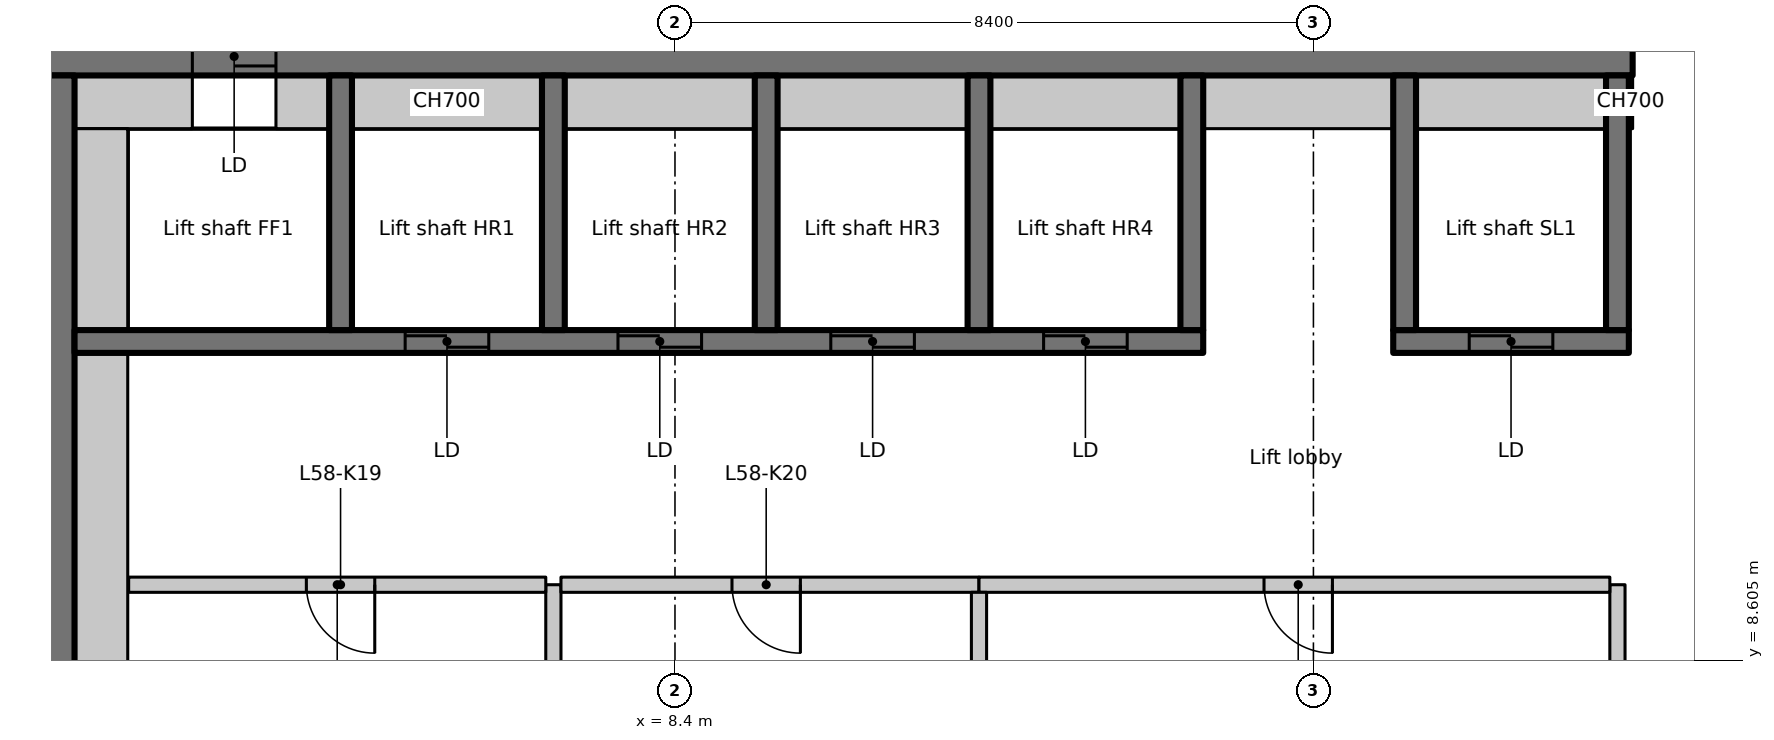
"""IFC4 building model, lengths in metres.
Left out: names, types, materials, properties, quantities, classifications, styles, units other than length and angle.
Written with IfcOpenShell. Run it as: python <this file> out.ifc"""

import sys

from ifc_helpers import new_model, si_unit, direction, frame, frame_2d, origin, place, context, subcontext, project, spatial, rectangle, extrude, element, fill, save


model = new_model("IFC4")
c1 = context("Model", 3, precision=1e-05, world=origin(), true_north=direction((0.0, 1.0)))
c2 = subcontext(c1, "Body", "Model", "MODEL_VIEW")
j1 = project(units=[si_unit("LENGTHUNIT", "METRE"), si_unit("PLANEANGLEUNIT", "RADIAN")], contexts=[c1])
p1 = place(None, origin())
s1 = spatial("IfcSite", under=j1, at=p1, CompositionType="ELEMENT")
p2 = place(p1, origin())
s2 = spatial("IfcBuilding", under=s1, at=p2, CompositionType="ELEMENT")
p3 = place(p2, frame((0.0, 0.0, 230.1)))
s3 = spatial("IfcBuildingStorey", under=s2, at=p3, CompositionType="ELEMENT", Elevation=230.1)
p4 = place(p3, frame((-1.1, 16.55, 0.0), z_axis=(0.0, 0.0, 1.0), x_axis=(1.0, 0.0, 0.0)))
e1 = element("IfcWall", 1, at=p4, inside=s3, PredefinedType="SHEAR", context=c2, shape_type="SweptSolid", body=[
    extrude(rectangle(XDim=22.1, YDim=0.5, at=frame_2d((11.05, 0.0))), origin(), (0.0, 0.0, 1.0), 3.35),
])
p5 = place(p4, frame((3.15, 0.0, 0.0)))
e2 = element("IfcOpeningElement", 2, at=p5, cuts=e1, PredefinedType="OPENING", context=c2, shape_type="SweptSolid", body=[
    extrude(rectangle(XDim=1.1, YDim=2.3, at=frame_2d((0.55, 1.15))), frame((0.0, 0.26, 0.0), z_axis=(0.0, -1.0, 0.0), x_axis=(1.0, 0.0, 0.0)), (0.0, 0.0, 1.0), 0.52),
])
p6 = place(p3, frame((0.25, 7.436, 0.0), z_axis=(0.0, 0.0, 1.0), x_axis=(0.0, 1.0, 0.0)))
e3 = element("IfcWall", 3, at=p6, inside=s3, PredefinedType="SHEAR", context=c2, shape_type="SweptSolid", body=[
    extrude(rectangle(XDim=8.864, YDim=0.5, at=frame_2d((4.432, 0.0))), origin(), (0.0, 0.0, 1.0), 3.35),
])
p7 = place(p3, frame((0.5, 15.95, 0.0), z_axis=(0.0, 0.0, 1.0), x_axis=(1.0, 0.0, 0.0)))
e4 = element("IfcWall", 4, at=p7, inside=s3, PredefinedType="PARTITIONING", context=c2, shape_type="SweptSolid", body=[
    extrude(rectangle(XDim=1.55, YDim=0.7, at=frame_2d((0.775, 0.0))), origin(), (0.0, 0.0, 1.0), 3.35),
])
p8 = place(p3, frame((0.5, 12.8, 0.0), z_axis=(0.0, 0.0, 1.0), x_axis=(1.0, 0.0, 0.0)))
e5 = element("IfcWall", 5, at=p8, inside=s3, PredefinedType="SHEAR", context=c2, shape_type="SweptSolid", body=[
    extrude(rectangle(XDim=14.85, YDim=0.3, at=frame_2d((7.425, 0.0))), origin(), (0.0, 0.0, 1.0), 3.35),
])
p9 = place(p8, frame((4.35, 0.0, 0.0)))
e6 = element("IfcOpeningElement", 6, at=p9, cuts=e5, PredefinedType="OPENING", context=c2, shape_type="SweptSolid", body=[
    extrude(rectangle(XDim=1.1, YDim=2.3, at=frame_2d((0.55, 1.15))), frame((0.0, 0.16, 0.0), z_axis=(0.0, -1.0, 0.0), x_axis=(1.0, 0.0, 0.0)), (0.0, 0.0, 1.0), 0.32),
])
p10 = place(p8, frame((7.15, 0.0, 0.0)))
e7 = element("IfcOpeningElement", 7, at=p10, cuts=e5, PredefinedType="OPENING", context=c2, shape_type="SweptSolid", body=[
    extrude(rectangle(XDim=1.1, YDim=2.3, at=frame_2d((0.55, 1.15))), frame((0.0, 0.16, 0.0), z_axis=(0.0, -1.0, 0.0), x_axis=(1.0, 0.0, 0.0)), (0.0, 0.0, 1.0), 0.32),
])
p11 = place(p8, frame((9.95, 0.0, 0.0)))
e8 = element("IfcOpeningElement", 8, at=p11, cuts=e5, PredefinedType="OPENING", context=c2, shape_type="SweptSolid", body=[
    extrude(rectangle(XDim=1.1, YDim=2.3, at=frame_2d((0.55, 1.15))), frame((0.0, 0.16, 0.0), z_axis=(0.0, -1.0, 0.0), x_axis=(1.0, 0.0, 0.0)), (0.0, 0.0, 1.0), 0.32),
])
p12 = place(p8, frame((12.75, 0.0, 0.0)))
e9 = element("IfcOpeningElement", 9, at=p12, cuts=e5, PredefinedType="OPENING", context=c2, shape_type="SweptSolid", body=[
    extrude(rectangle(XDim=1.1, YDim=2.3, at=frame_2d((0.55, 1.15))), frame((0.0, 0.16, 0.0), z_axis=(0.0, -1.0, 0.0), x_axis=(1.0, 0.0, 0.0)), (0.0, 0.0, 1.0), 0.32),
])
for number, where, z_axis, x_axis in (
    (10, (4.0, 12.95, 0.0), (0.0, 0.0, 1.0), (0.0, 1.0, 0.0)),
    (11, (6.8, 12.95, 0.0), (0.0, 0.0, 1.0), (0.0, 1.0, 0.0)),
    (12, (9.6, 12.95, 0.0), (0.0, 0.0, 1.0), (0.0, 1.0, 0.0)),
    (13, (12.4, 12.95, 0.0), (0.0, 0.0, 1.0), (0.0, 1.0, 0.0)),
    (14, (15.2, 12.95, 0.0), (0.0, 0.0, 1.0), (0.0, 1.0, 0.0)),
):
    element("IfcWall", number, at=place(p3, frame(where, z_axis=z_axis, x_axis=x_axis)), inside=s3, PredefinedType="SHEAR", context=c2, shape_type="SweptSolid", body=[
        extrude(rectangle(XDim=3.35, YDim=0.3, at=frame_2d((1.675, 0.0))), origin(), (0.0, 0.0, 1.0), 3.35),
    ])
p13 = place(p3, frame((17.85, 12.8, 0.0), z_axis=(0.0, 0.0, 1.0), x_axis=(1.0, 0.0, 0.0)))
e15 = element("IfcWall", 15, at=p13, inside=s3, PredefinedType="SHEAR", context=c2, shape_type="SweptSolid", body=[
    extrude(rectangle(XDim=3.1, YDim=0.3, at=frame_2d((1.55, 0.0))), origin(), (0.0, 0.0, 1.0), 3.35),
])
p14 = place(p13, frame((1.0, 0.0, 0.0)))
e16 = element("IfcOpeningElement", 16, at=p14, cuts=e15, PredefinedType="OPENING", context=c2, shape_type="SweptSolid", body=[
    extrude(rectangle(XDim=1.1, YDim=2.3, at=frame_2d((0.55, 1.15))), frame((0.0, 0.16, 0.0), z_axis=(0.0, -1.0, 0.0), x_axis=(1.0, 0.0, 0.0)), (0.0, 0.0, 1.0), 0.32),
])
for number, where, z_axis, x_axis in (
    (17, (18.0, 12.95, 0.0), (0.0, 0.0, 1.0), (0.0, 1.0, 0.0)),
    (18, (20.8, 12.95, 0.0), (0.0, 0.0, 1.0), (0.0, 1.0, 0.0)),
):
    element("IfcWall", number, at=place(p3, frame(where, z_axis=z_axis, x_axis=x_axis)), inside=s3, PredefinedType="SHEAR", context=c2, shape_type="SweptSolid", body=[
        extrude(rectangle(XDim=3.35, YDim=0.3, at=frame_2d((1.675, 0.0))), origin(), (0.0, 0.0, 1.0), 3.35),
    ])
p15 = place(p3, frame((6.8, 9.6, 0.0), z_axis=(0.0, 0.0, 1.0), x_axis=(0.0, -1.0, 0.0)))
e19 = element("IfcWall", 19, at=p15, inside=s3, PredefinedType="PARTITIONING", context=c2, shape_type="SweptSolid", body=[
    extrude(rectangle(XDim=2.5, YDim=0.2, at=frame_2d((1.25, 0.0))), origin(), (0.0, 0.0, 1.0), 3.35),
])
p16 = place(p3, frame((6.7, 9.6, 0.0), z_axis=(0.0, 0.0, 1.0), x_axis=(-1.0, 0.0, 0.0)))
e20 = element("IfcWall", 20, at=p16, inside=s3, PredefinedType="PARTITIONING", context=c2, shape_type="SweptSolid", body=[
    extrude(rectangle(XDim=5.488, YDim=0.2, at=frame_2d((2.744, 0.0))), origin(), (0.0, 0.0, 1.0), 3.35),
])
p17 = place(p16, frame((2.25, 0.0, 0.0)))
e21 = element("IfcOpeningElement", 21, at=p17, cuts=e20, PredefinedType="OPENING", context=c2, shape_type="SweptSolid", body=[
    extrude(rectangle(XDim=0.9, YDim=2.1, at=frame_2d((0.45, 1.05))), frame((0.0, 0.11, 0.0), z_axis=(0.0, -1.0, 0.0), x_axis=(1.0, 0.0, 0.0)), (0.0, 0.0, 1.0), 0.22),
])
p18 = place(p3, frame((12.4, 9.6, 0.0), z_axis=(0.0, 0.0, 1.0), x_axis=(-1.0, 0.0, 0.0)))
e22 = element("IfcWall", 22, at=p18, inside=s3, PredefinedType="PARTITIONING", context=c2, shape_type="SweptSolid", body=[
    extrude(rectangle(XDim=5.5, YDim=0.2, at=frame_2d((2.75, 0.0))), origin(), (0.0, 0.0, 1.0), 3.35),
])
p19 = place(p18, frame((2.35, 0.0, 0.0)))
e23 = element("IfcOpeningElement", 23, at=p19, cuts=e22, PredefinedType="OPENING", context=c2, shape_type="SweptSolid", body=[
    extrude(rectangle(XDim=0.9, YDim=2.1, at=frame_2d((0.45, 1.05))), frame((0.0, 0.11, 0.0), z_axis=(0.0, -1.0, 0.0), x_axis=(1.0, 0.0, 0.0)), (0.0, 0.0, 1.0), 0.22),
])
p20 = place(p3, frame((20.8, 7.1, 0.0), z_axis=(0.0, 0.0, 1.0), x_axis=(0.0, 1.0, 0.0)))
e24 = element("IfcWall", 24, at=p20, inside=s3, PredefinedType="PARTITIONING", context=c2, shape_type="SweptSolid", body=[
    extrude(rectangle(XDim=2.5, YDim=0.2, at=frame_2d((1.25, 0.0))), origin(), (0.0, 0.0, 1.0), 3.35),
])
p21 = place(p3, frame((20.7, 9.6, 0.0), z_axis=(0.0, 0.0, 1.0), x_axis=(-1.0, 0.0, 0.0)))
e25 = element("IfcWall", 25, at=p21, inside=s3, PredefinedType="PARTITIONING", context=c2, shape_type="SweptSolid", body=[
    extrude(rectangle(XDim=8.3, YDim=0.2, at=frame_2d((4.15, 0.0))), origin(), (0.0, 0.0, 1.0), 3.35),
])
p22 = place(p21, frame((3.65, 0.0, 0.0)))
e26 = element("IfcOpeningElement", 26, at=p22, cuts=e25, PredefinedType="OPENING", context=c2, shape_type="SweptSolid", body=[
    extrude(rectangle(XDim=0.9, YDim=2.1, at=frame_2d((0.45, 1.05))), frame((0.0, 0.11, 0.0), z_axis=(0.0, -1.0, 0.0), x_axis=(1.0, 0.0, 0.0)), (0.0, 0.0, 1.0), 0.22),
])
p23 = place(p3, frame((12.4, 9.5, 0.0), z_axis=(0.0, 0.0, 1.0), x_axis=(0.0, -1.0, 0.0)))
e27 = element("IfcWall", 27, at=p23, inside=s3, PredefinedType="PARTITIONING", context=c2, shape_type="SweptSolid", body=[
    extrude(rectangle(XDim=2.4, YDim=0.2, at=frame_2d((1.2, 0.0))), origin(), (0.0, 0.0, 1.0), 3.35),
])
p24 = place(p3, frame((0.85, 7.436, 0.0), z_axis=(0.0, 0.0, 1.0), x_axis=(0.0, 1.0, 0.0)))
e28 = element("IfcWall", 28, at=p24, inside=s3, PredefinedType="PARTITIONING", context=c2, shape_type="SweptSolid", body=[
    extrude(rectangle(XDim=5.214, YDim=0.7, at=frame_2d((2.607, 0.0))), origin(), (0.0, 0.0, 1.0), 3.35),
])
p25 = place(p3, frame((0.85, 12.95, 0.0), z_axis=(0.0, 0.0, 1.0), x_axis=(0.0, 1.0, 0.0)))
e29 = element("IfcWall", 29, at=p25, inside=s3, PredefinedType="PARTITIONING", context=c2, shape_type="SweptSolid", body=[
    extrude(rectangle(XDim=2.65, YDim=0.7, at=frame_2d((1.325, 0.0))), origin(), (0.0, 0.0, 1.0), 3.35),
])
p26 = place(p3, frame((3.15, 15.95, 0.0), z_axis=(0.0, 0.0, 1.0), x_axis=(1.0, 0.0, 0.0)))
e30 = element("IfcWall", 30, at=p26, inside=s3, PredefinedType="PARTITIONING", context=c2, shape_type="SweptSolid", body=[
    extrude(rectangle(XDim=0.7, YDim=0.7, at=frame_2d((0.35, 0.0))), origin(), (0.0, 0.0, 1.0), 3.35),
])
for number, where, z_axis, x_axis in (
    (31, (4.15, 15.95, 0.0), (0.0, 0.0, 1.0), (1.0, 0.0, 0.0)),
    (32, (6.95, 15.95, 0.0), (0.0, 0.0, 1.0), (1.0, 0.0, 0.0)),
    (33, (9.75, 15.95, 0.0), (0.0, 0.0, 1.0), (1.0, 0.0, 0.0)),
    (34, (12.55, 15.95, 0.0), (0.0, 0.0, 1.0), (1.0, 0.0, 0.0)),
    (35, (15.35, 15.95, 0.0), (0.0, 0.0, 1.0), (1.0, 0.0, 0.0)),
    (36, (18.15, 15.95, 0.0), (0.0, 0.0, 1.0), (1.0, 0.0, 0.0)),
):
    element("IfcWall", number, at=place(p3, frame(where, z_axis=z_axis, x_axis=x_axis)), inside=s3, PredefinedType="PARTITIONING", context=c2, shape_type="SweptSolid", body=[
        extrude(rectangle(XDim=2.5, YDim=0.7, at=frame_2d((1.25, 0.0))), origin(), (0.0, 0.0, 1.0), 3.35),
    ])
p27 = place(p3, frame((20.95, 15.95, 0.0), z_axis=(0.0, 0.0, 1.0), x_axis=(1.0, 0.0, 0.0)))
e37 = element("IfcWall", 37, at=p27, inside=s3, PredefinedType="PARTITIONING", context=c2, shape_type="SweptSolid", body=[
    extrude(rectangle(XDim=0.05, YDim=0.7, at=frame_2d((0.025, 0.0))), origin(), (0.0, 0.0, 1.0), 3.35),
])
p28 = place(p5, origin())
e38 = element("IfcDoor", 38, at=p28, inside=s3, OperationType="SLIDING_TO_LEFT", PredefinedType="DOOR", context=c2, shape_type="SweptSolid", body=[
    extrude(rectangle(XDim=1.1, YDim=2.3, at=frame_2d((0.55, 1.15))), frame((0.0, 0.025, 0.0), z_axis=(0.0, -1.0, 0.0), x_axis=(1.0, 0.0, 0.0)), (0.0, 0.0, 1.0), 0.05),
])
fill(e2, e38)
p29 = place(p9, origin())
e39 = element("IfcDoor", 39, at=p29, inside=s3, OperationType="SLIDING_TO_LEFT", PredefinedType="DOOR", context=c2, shape_type="SweptSolid", body=[
    extrude(rectangle(XDim=1.1, YDim=2.3, at=frame_2d((0.55, 1.15))), frame((0.0, 0.025, 0.0), z_axis=(0.0, -1.0, 0.0), x_axis=(1.0, 0.0, 0.0)), (0.0, 0.0, 1.0), 0.05),
])
fill(e6, e39)
p30 = place(p10, origin())
e40 = element("IfcDoor", 40, at=p30, inside=s3, OperationType="SLIDING_TO_LEFT", PredefinedType="DOOR", context=c2, shape_type="SweptSolid", body=[
    extrude(rectangle(XDim=1.1, YDim=2.3, at=frame_2d((0.55, 1.15))), frame((0.0, 0.025, 0.0), z_axis=(0.0, -1.0, 0.0), x_axis=(1.0, 0.0, 0.0)), (0.0, 0.0, 1.0), 0.05),
])
fill(e7, e40)
p31 = place(p11, origin())
e41 = element("IfcDoor", 41, at=p31, inside=s3, OperationType="SLIDING_TO_LEFT", PredefinedType="DOOR", context=c2, shape_type="SweptSolid", body=[
    extrude(rectangle(XDim=1.1, YDim=2.3, at=frame_2d((0.55, 1.15))), frame((0.0, 0.025, 0.0), z_axis=(0.0, -1.0, 0.0), x_axis=(1.0, 0.0, 0.0)), (0.0, 0.0, 1.0), 0.05),
])
fill(e8, e41)
p32 = place(p12, origin())
e42 = element("IfcDoor", 42, at=p32, inside=s3, OperationType="SLIDING_TO_LEFT", PredefinedType="DOOR", context=c2, shape_type="SweptSolid", body=[
    extrude(rectangle(XDim=1.1, YDim=2.3, at=frame_2d((0.55, 1.15))), frame((0.0, 0.025, 0.0), z_axis=(0.0, -1.0, 0.0), x_axis=(1.0, 0.0, 0.0)), (0.0, 0.0, 1.0), 0.05),
])
fill(e9, e42)
p33 = place(p14, origin())
e43 = element("IfcDoor", 43, at=p33, inside=s3, OperationType="SLIDING_TO_LEFT", PredefinedType="DOOR", context=c2, shape_type="SweptSolid", body=[
    extrude(rectangle(XDim=1.1, YDim=2.3, at=frame_2d((0.55, 1.15))), frame((0.0, 0.025, 0.0), z_axis=(0.0, -1.0, 0.0), x_axis=(1.0, 0.0, 0.0)), (0.0, 0.0, 1.0), 0.05),
])
fill(e16, e43)
p34 = place(p17, origin())
e44 = element("IfcDoor", 44, at=p34, inside=s3, OperationType="SINGLE_SWING_RIGHT", PredefinedType="DOOR", context=c2, shape_type="SweptSolid", body=[
    extrude(rectangle(XDim=0.9, YDim=2.1, at=frame_2d((0.45, 1.05))), frame((0.0, 0.025, 0.0), z_axis=(0.0, -1.0, 0.0), x_axis=(1.0, 0.0, 0.0)), (0.0, 0.0, 1.0), 0.05),
])
fill(e21, e44)
p35 = place(p19, origin())
e45 = element("IfcDoor", 45, at=p35, inside=s3, OperationType="SINGLE_SWING_LEFT", PredefinedType="DOOR", context=c2, shape_type="SweptSolid", body=[
    extrude(rectangle(XDim=0.9, YDim=2.1, at=frame_2d((0.45, 1.05))), frame((0.0, 0.025, 0.0), z_axis=(0.0, -1.0, 0.0), x_axis=(1.0, 0.0, 0.0)), (0.0, 0.0, 1.0), 0.05),
])
fill(e23, e45)
p36 = place(p22, origin())
e46 = element("IfcDoor", 46, at=p36, inside=s3, OperationType="SINGLE_SWING_RIGHT", PredefinedType="DOOR", context=c2, shape_type="SweptSolid", body=[
    extrude(rectangle(XDim=0.9, YDim=2.1, at=frame_2d((0.45, 1.05))), frame((0.0, 0.025, 0.0), z_axis=(0.0, -1.0, 0.0), x_axis=(1.0, 0.0, 0.0)), (0.0, 0.0, 1.0), 0.05),
])
fill(e26, e46)
save(model, sys.argv[1])
